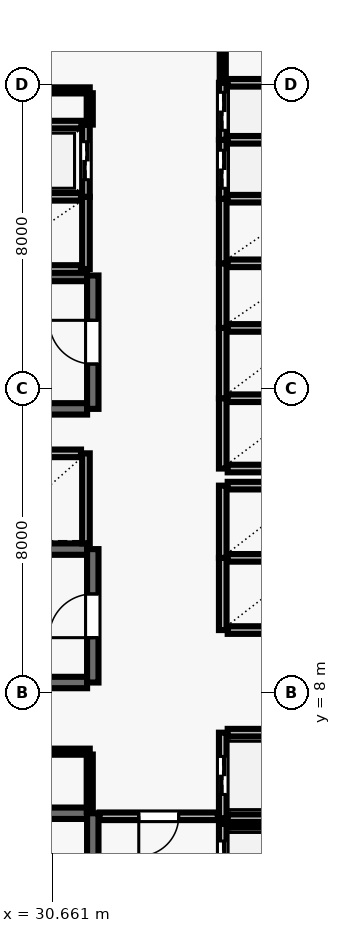
"""IFC4 building model, lengths in metres.
Left out: names, types, materials, properties, quantities, classifications, styles, units other than length and angle.
Written with IfcOpenShell. Run it as: python <this file> out.ifc"""

import sys

from ifc_helpers import new_model, si_unit, direction, frame, frame_2d, origin, place, context, subcontext, project, spatial, rectangle, extrude, element, fill, save


model = new_model("IFC4")
c1 = context("Model", 3, precision=1e-05, world=origin(), true_north=direction((0.0, 1.0)))
c2 = subcontext(c1, "Body", "Model", "MODEL_VIEW")
j1 = project(units=[si_unit("LENGTHUNIT", "METRE"), si_unit("PLANEANGLEUNIT", "RADIAN")], contexts=[c1])
p1 = place(None, origin())
s1 = spatial("IfcSite", under=j1, at=p1, CompositionType="ELEMENT")
p2 = place(p1, origin())
s2 = spatial("IfcBuilding", under=s1, at=p2, CompositionType="ELEMENT")
p3 = place(p2, frame((0.0, 0.0, 5.2)))
s3 = spatial("IfcBuildingStorey", under=s2, at=p3, CompositionType="ELEMENT", Elevation=5.2)
p4 = place(p3, frame((31.58, 4.83, 0.0), z_axis=(0.0, 0.0, 1.0), x_axis=(-1.0, 0.0, 0.0)))
e1 = element("IfcWall", 1, at=p4, inside=s3, PredefinedType="SHEAR", context=c2, shape_type="SweptSolid", body=[
    extrude(rectangle(XDim=8.36, YDim=0.3, at=frame_2d((4.18, 0.0))), origin(), (0.0, 0.0, 1.0), 4.92),
])
p5 = place(p3, frame((31.73, 0.96, 0.0), z_axis=(0.0, 0.0, 1.0), x_axis=(0.0, 1.0, 0.0)))
e2 = element("IfcWall", 2, at=p5, inside=s3, PredefinedType="SHEAR", context=c2, shape_type="SweptSolid", body=[
    extrude(rectangle(XDim=3.87, YDim=0.3, at=frame_2d((1.935, 0.0))), origin(), (0.0, 0.0, 1.0), 4.92),
])
p6 = place(p5, frame((1.54, 0.0, 0.0)))
e3 = element("IfcOpeningElement", 3, at=p6, cuts=e2, PredefinedType="OPENING", context=c2, shape_type="SweptSolid", body=[
    extrude(rectangle(XDim=1.15, YDim=2.15, at=frame_2d((0.575, 1.075))), frame((0.0, 0.16, 0.0), z_axis=(0.0, -1.0, 0.0), x_axis=(1.0, 0.0, 0.0)), (0.0, 0.0, 1.0), 0.32),
])
for number, where, z_axis, x_axis in (
    (4, (31.58, 18.98, 0.0), (0.0, 0.0, 1.0), (-1.0, 0.0, 0.0)),
    (5, (23.22, 15.47, 0.0), (0.0, 0.0, 1.0), (1.0, 0.0, 0.0)),
):
    element("IfcWall", number, at=place(p3, frame(where, z_axis=z_axis, x_axis=x_axis)), inside=s3, PredefinedType="SHEAR", context=c2, shape_type="SweptSolid", body=[
        extrude(rectangle(XDim=8.36, YDim=0.3, at=frame_2d((4.18, 0.0))), origin(), (0.0, 0.0, 1.0), 4.92),
    ])
p7 = place(p3, frame((31.73, 15.47, 0.0), z_axis=(0.0, 0.0, 1.0), x_axis=(0.0, 1.0, 0.0)))
e6 = element("IfcWall", 6, at=p7, inside=s3, PredefinedType="SHEAR", context=c2, shape_type="SweptSolid", body=[
    extrude(rectangle(XDim=3.51, YDim=0.3, at=frame_2d((1.755, 0.0))), origin(), (0.0, 0.0, 1.0), 4.92),
])
p8 = place(p7, frame((1.18, 0.0, 0.0)))
e7 = element("IfcOpeningElement", 7, at=p8, cuts=e6, PredefinedType="OPENING", context=c2, shape_type="SweptSolid", body=[
    extrude(rectangle(XDim=1.15, YDim=2.15, at=frame_2d((0.575, 1.075))), frame((0.0, 0.16, 0.0), z_axis=(0.0, -1.0, 0.0), x_axis=(1.0, 0.0, 0.0)), (0.0, 0.0, 1.0), 0.32),
])
for number, where, z_axis, x_axis in (
    (8, (31.58, 11.78, 0.0), (0.0, 0.0, 1.0), (-1.0, 0.0, 0.0)),
    (9, (23.22, 8.27, 0.0), (0.0, 0.0, 1.0), (1.0, 0.0, 0.0)),
):
    element("IfcWall", number, at=place(p3, frame(where, z_axis=z_axis, x_axis=x_axis)), inside=s3, PredefinedType="SHEAR", context=c2, shape_type="SweptSolid", body=[
        extrude(rectangle(XDim=8.36, YDim=0.3, at=frame_2d((4.18, 0.0))), origin(), (0.0, 0.0, 1.0), 4.92),
    ])
p9 = place(p3, frame((31.73, 8.27, 0.0), z_axis=(0.0, 0.0, 1.0), x_axis=(0.0, 1.0, 0.0)))
e10 = element("IfcWall", 10, at=p9, inside=s3, PredefinedType="SHEAR", context=c2, shape_type="SweptSolid", body=[
    extrude(rectangle(XDim=3.51, YDim=0.3, at=frame_2d((1.755, 0.0))), origin(), (0.0, 0.0, 1.0), 4.92),
])
p10 = place(p9, frame((1.18, 0.0, 0.0)))
e11 = element("IfcOpeningElement", 11, at=p10, cuts=e10, PredefinedType="OPENING", context=c2, shape_type="SweptSolid", body=[
    extrude(rectangle(XDim=1.15, YDim=2.15, at=frame_2d((0.575, 1.075))), frame((0.0, 0.16, 0.0), z_axis=(0.0, -1.0, 0.0), x_axis=(1.0, 0.0, 0.0)), (0.0, 0.0, 1.0), 0.32),
])
p11 = place(p3, frame((35.15, 4.55, 0.0), z_axis=(0.0, 0.0, 1.0), x_axis=(0.0, -1.0, 0.0)))
e12 = element("IfcWall", 12, at=p11, inside=s3, PredefinedType="SOLIDWALL", context=c2, shape_type="SweptSolid", body=[
    extrude(rectangle(XDim=2.1, YDim=0.2, at=frame_2d((1.05, 0.0))), origin(), (0.0, 0.0, 1.0), 4.92),
])
p12 = place(p11, frame((0.45, 0.0, 0.0)))
e13 = element("IfcOpeningElement", 13, at=p12, cuts=e12, PredefinedType="OPENING", context=c2, shape_type="SweptSolid", body=[
    extrude(rectangle(XDim=1.2, YDim=2.15, at=frame_2d((0.6, 1.075))), frame((0.0, 0.11, 0.0), z_axis=(0.0, -1.0, 0.0), x_axis=(1.0, 0.0, 0.0)), (0.0, 0.0, 1.0), 0.22),
])
p13 = place(p3, frame((37.42, 4.55, 0.0), z_axis=(0.0, 0.0, 1.0), x_axis=(-1.0, 0.0, 0.0)))
e14 = element("IfcWall", 14, at=p13, inside=s3, PredefinedType="SOLIDWALL", context=c2, shape_type="SweptSolid", body=[
    extrude(rectangle(XDim=2.14, YDim=0.2, at=frame_2d((1.07, 0.0))), origin(), (0.0, 0.0, 1.0), 4.92),
])
p14 = place(p3, frame((35.15, 6.95, 0.0), z_axis=(0.0, 0.0, 1.0), x_axis=(0.0, -1.0, 0.0)))
e15 = element("IfcWall", 15, at=p14, inside=s3, PredefinedType="SOLIDWALL", context=c2, shape_type="SweptSolid", body=[
    extrude(rectangle(XDim=2.25, YDim=0.2, at=frame_2d((1.125, 0.0))), origin(), (0.0, 0.0, 1.0), 4.92),
])
p15 = place(p14, frame((0.625, 0.0, 0.0)))
e16 = element("IfcOpeningElement", 16, at=p15, cuts=e15, PredefinedType="OPENING", context=c2, shape_type="SweptSolid", body=[
    extrude(rectangle(XDim=1.0, YDim=2.1, at=frame_2d((0.5, 1.05))), frame((0.0, 0.11, 0.0), z_axis=(0.0, -1.0, 0.0), x_axis=(1.0, 0.0, 0.0)), (0.0, 0.0, 1.0), 0.22),
])
for number, where, z_axis, x_axis in (
    (17, (35.28, 4.7, 0.0), (0.0, 0.0, 1.0), (1.0, 0.0, 0.0)),
    (18, (37.42, 6.95, 0.0), (0.0, 0.0, 1.0), (-1.0, 0.0, 0.0)),
):
    element("IfcWall", number, at=place(p3, frame(where, z_axis=z_axis, x_axis=x_axis)), inside=s3, PredefinedType="SOLIDWALL", context=c2, shape_type="SweptSolid", body=[
        extrude(rectangle(XDim=2.14, YDim=0.2, at=frame_2d((1.07, 0.0))), origin(), (0.0, 0.0, 1.0), 4.92),
    ])
p16 = place(p3, frame((35.15, 11.55, 0.0), z_axis=(0.0, 0.0, 1.0), x_axis=(0.0, -1.0, 0.0)))
e19 = element("IfcWall", 19, at=p16, inside=s3, PredefinedType="SOLIDWALL", context=c2, shape_type="SweptSolid", body=[
    extrude(rectangle(XDim=1.9, YDim=0.2, at=frame_2d((0.95, 0.0))), origin(), (0.0, 0.0, 1.0), 4.92),
])
for number, where, z_axis, x_axis in (
    (20, (35.28, 9.65, 0.0), (0.0, 0.0, 1.0), (1.0, 0.0, 0.0)),
    (21, (37.42, 11.55, 0.0), (0.0, 0.0, 1.0), (-1.0, 0.0, 0.0)),
):
    element("IfcWall", number, at=place(p3, frame(where, z_axis=z_axis, x_axis=x_axis)), inside=s3, PredefinedType="SOLIDWALL", context=c2, shape_type="SweptSolid", body=[
        extrude(rectangle(XDim=2.14, YDim=0.2, at=frame_2d((1.07, 0.0))), origin(), (0.0, 0.0, 1.0), 4.92),
    ])
p17 = place(p3, frame((35.15, 13.45, 0.0), z_axis=(0.0, 0.0, 1.0), x_axis=(0.0, -1.0, 0.0)))
e22 = element("IfcWall", 22, at=p17, inside=s3, PredefinedType="SOLIDWALL", context=c2, shape_type="SweptSolid", body=[
    extrude(rectangle(XDim=1.9, YDim=0.2, at=frame_2d((0.95, 0.0))), origin(), (0.0, 0.0, 1.0), 4.92),
])
p18 = place(p3, frame((37.42, 13.45, 0.0), z_axis=(0.0, 0.0, 1.0), x_axis=(-1.0, 0.0, 0.0)))
e23 = element("IfcWall", 23, at=p18, inside=s3, PredefinedType="SOLIDWALL", context=c2, shape_type="SweptSolid", body=[
    extrude(rectangle(XDim=2.14, YDim=0.2, at=frame_2d((1.07, 0.0))), origin(), (0.0, 0.0, 1.0), 4.92),
])
p19 = place(p3, frame((31.55, 11.93, 0.0), z_axis=(0.0, 0.0, 1.0), x_axis=(0.0, 1.0, 0.0)))
e24 = element("IfcWall", 24, at=p19, inside=s3, PredefinedType="SOLIDWALL", context=c2, shape_type="SweptSolid", body=[
    extrude(rectangle(XDim=2.37, YDim=0.2, at=frame_2d((1.185, 0.0))), origin(), (0.0, 0.0, 1.0), 4.92),
])
p20 = place(p3, frame((31.42, 14.3, 0.0), z_axis=(0.0, 0.0, 1.0), x_axis=(-1.0, 0.0, 0.0)))
e25 = element("IfcWall", 25, at=p20, inside=s3, PredefinedType="SOLIDWALL", context=c2, shape_type="SweptSolid", body=[
    extrude(rectangle(XDim=2.44, YDim=0.2, at=frame_2d((1.22, 0.0))), origin(), (0.0, 0.0, 1.0), 4.92),
])
p21 = place(p3, frame((35.15, 15.75, 0.0), z_axis=(0.0, 0.0, 1.0), x_axis=(0.0, -1.0, 0.0)))
e26 = element("IfcWall", 26, at=p21, inside=s3, PredefinedType="SOLIDWALL", context=c2, shape_type="SweptSolid", body=[
    extrude(rectangle(XDim=1.85, YDim=0.2, at=frame_2d((0.925, 0.0))), origin(), (0.0, 0.0, 1.0), 4.92),
])
for number, where, z_axis, x_axis in (
    (27, (35.28, 13.9, 0.0), (0.0, 0.0, 1.0), (1.0, 0.0, 0.0)),
    (28, (37.42, 15.75, 0.0), (0.0, 0.0, 1.0), (-1.0, 0.0, 0.0)),
):
    element("IfcWall", number, at=place(p3, frame(where, z_axis=z_axis, x_axis=x_axis)), inside=s3, PredefinedType="SOLIDWALL", context=c2, shape_type="SweptSolid", body=[
        extrude(rectangle(XDim=2.14, YDim=0.2, at=frame_2d((1.07, 0.0))), origin(), (0.0, 0.0, 1.0), 4.92),
    ])
p22 = place(p3, frame((35.15, 17.6, 0.0), z_axis=(0.0, 0.0, 1.0), x_axis=(0.0, -1.0, 0.0)))
e29 = element("IfcWall", 29, at=p22, inside=s3, PredefinedType="SOLIDWALL", context=c2, shape_type="SweptSolid", body=[
    extrude(rectangle(XDim=1.85, YDim=0.2, at=frame_2d((0.925, 0.0))), origin(), (0.0, 0.0, 1.0), 4.92),
])
p23 = place(p3, frame((37.42, 17.6, 0.0), z_axis=(0.0, 0.0, 1.0), x_axis=(-1.0, 0.0, 0.0)))
e30 = element("IfcWall", 30, at=p23, inside=s3, PredefinedType="SOLIDWALL", context=c2, shape_type="SweptSolid", body=[
    extrude(rectangle(XDim=2.14, YDim=0.2, at=frame_2d((1.07, 0.0))), origin(), (0.0, 0.0, 1.0), 4.92),
])
p24 = place(p3, frame((35.15, 19.3, 0.0), z_axis=(0.0, 0.0, 1.0), x_axis=(0.0, -1.0, 0.0)))
e31 = element("IfcWall", 31, at=p24, inside=s3, PredefinedType="SOLIDWALL", context=c2, shape_type="SweptSolid", body=[
    extrude(rectangle(XDim=1.7, YDim=0.2, at=frame_2d((0.85, 0.0))), origin(), (0.0, 0.0, 1.0), 4.92),
])
p25 = place(p3, frame((37.42, 19.3, 0.0), z_axis=(0.0, 0.0, 1.0), x_axis=(-1.0, 0.0, 0.0)))
e32 = element("IfcWall", 32, at=p25, inside=s3, PredefinedType="SOLIDWALL", context=c2, shape_type="SweptSolid", body=[
    extrude(rectangle(XDim=2.14, YDim=0.2, at=frame_2d((1.07, 0.0))), origin(), (0.0, 0.0, 1.0), 4.92),
])
p26 = place(p3, frame((35.15, 21.0, 0.0), z_axis=(0.0, 0.0, 1.0), x_axis=(0.0, -1.0, 0.0)))
e33 = element("IfcWall", 33, at=p26, inside=s3, PredefinedType="SOLIDWALL", context=c2, shape_type="SweptSolid", body=[
    extrude(rectangle(XDim=1.7, YDim=0.2, at=frame_2d((0.85, 0.0))), origin(), (0.0, 0.0, 1.0), 4.92),
])
p27 = place(p3, frame((37.42, 21.0, 0.0), z_axis=(0.0, 0.0, 1.0), x_axis=(-1.0, 0.0, 0.0)))
e34 = element("IfcWall", 34, at=p27, inside=s3, PredefinedType="SOLIDWALL", context=c2, shape_type="SweptSolid", body=[
    extrude(rectangle(XDim=2.14, YDim=0.2, at=frame_2d((1.07, 0.0))), origin(), (0.0, 0.0, 1.0), 4.92),
])
p28 = place(p3, frame((31.55, 19.15, 0.0), z_axis=(0.0, 0.0, 1.0), x_axis=(0.0, 1.0, 0.0)))
e35 = element("IfcWall", 35, at=p28, inside=s3, PredefinedType="SOLIDWALL", context=c2, shape_type="SweptSolid", body=[
    extrude(rectangle(XDim=1.9, YDim=0.2, at=frame_2d((0.95, 0.0))), origin(), (0.0, 0.0, 1.0), 4.92),
])
for number, where, z_axis, x_axis in (
    (36, (28.98, 19.15, 0.0), (0.0, 0.0, 1.0), (1.0, 0.0, 0.0)),
    (37, (31.42, 21.05, 0.0), (0.0, 0.0, 1.0), (-1.0, 0.0, 0.0)),
):
    element("IfcWall", number, at=place(p3, frame(where, z_axis=z_axis, x_axis=x_axis)), inside=s3, PredefinedType="SOLIDWALL", context=c2, shape_type="SweptSolid", body=[
        extrude(rectangle(XDim=2.44, YDim=0.2, at=frame_2d((1.22, 0.0))), origin(), (0.0, 0.0, 1.0), 4.92),
    ])
p29 = place(p3, frame((35.15, 22.55, 0.0), z_axis=(0.0, 0.0, 1.0), x_axis=(0.0, -1.0, 0.0)))
e38 = element("IfcWall", 38, at=p29, inside=s3, PredefinedType="SOLIDWALL", context=c2, shape_type="SweptSolid", body=[
    extrude(rectangle(XDim=1.55, YDim=0.2, at=frame_2d((0.775, 0.0))), origin(), (0.0, 0.0, 1.0), 4.92),
])
p30 = place(p29, frame((0.275, 0.0, 0.0)))
e39 = element("IfcOpeningElement", 39, at=p30, cuts=e38, PredefinedType="OPENING", context=c2, shape_type="SweptSolid", body=[
    extrude(rectangle(XDim=1.0, YDim=2.1, at=frame_2d((0.5, 1.05))), frame((0.0, 0.11, 0.0), z_axis=(0.0, -1.0, 0.0), x_axis=(1.0, 0.0, 0.0)), (0.0, 0.0, 1.0), 0.22),
])
p31 = place(p3, frame((37.42, 22.55, 0.0), z_axis=(0.0, 0.0, 1.0), x_axis=(-1.0, 0.0, 0.0)))
e40 = element("IfcWall", 40, at=p31, inside=s3, PredefinedType="SOLIDWALL", context=c2, shape_type="SweptSolid", body=[
    extrude(rectangle(XDim=2.14, YDim=0.2, at=frame_2d((1.07, 0.0))), origin(), (0.0, 0.0, 1.0), 4.92),
])
p32 = place(p3, frame((35.15, 24.05, 0.0), z_axis=(0.0, 0.0, 1.0), x_axis=(0.0, -1.0, 0.0)))
e41 = element("IfcWall", 41, at=p32, inside=s3, PredefinedType="SOLIDWALL", context=c2, shape_type="SweptSolid", body=[
    extrude(rectangle(XDim=1.5, YDim=0.2, at=frame_2d((0.75, 0.0))), origin(), (0.0, 0.0, 1.0), 4.92),
])
p33 = place(p32, frame((0.25, 0.0, 0.0)))
e42 = element("IfcOpeningElement", 42, at=p33, cuts=e41, PredefinedType="OPENING", context=c2, shape_type="SweptSolid", body=[
    extrude(rectangle(XDim=1.0, YDim=2.1, at=frame_2d((0.5, 1.05))), frame((0.0, 0.11, 0.0), z_axis=(0.0, -1.0, 0.0), x_axis=(1.0, 0.0, 0.0)), (0.0, 0.0, 1.0), 0.22),
])
p34 = place(p3, frame((37.42, 24.05, 0.0), z_axis=(0.0, 0.0, 1.0), x_axis=(-1.0, 0.0, 0.0)))
e43 = element("IfcWall", 43, at=p34, inside=s3, PredefinedType="SOLIDWALL", context=c2, shape_type="SweptSolid", body=[
    extrude(rectangle(XDim=2.14, YDim=0.2, at=frame_2d((1.07, 0.0))), origin(), (0.0, 0.0, 1.0), 4.92),
])
p35 = place(p3, frame((31.55, 21.05, 0.0), z_axis=(0.0, 0.0, 1.0), x_axis=(0.0, 1.0, 0.0)))
e44 = element("IfcWall", 44, at=p35, inside=s3, PredefinedType="SOLIDWALL", context=c2, shape_type="SweptSolid", body=[
    extrude(rectangle(XDim=1.9, YDim=0.2, at=frame_2d((0.95, 0.0))), origin(), (0.0, 0.0, 1.0), 4.92),
])
p36 = place(p35, frame((0.45, 0.0, 0.0)))
e45 = element("IfcOpeningElement", 45, at=p36, cuts=e44, PredefinedType="OPENING", context=c2, shape_type="SweptSolid", body=[
    extrude(rectangle(XDim=1.0, YDim=2.1, at=frame_2d((0.5, 1.05))), frame((0.0, 0.11, 0.0), z_axis=(0.0, -1.0, 0.0), x_axis=(1.0, 0.0, 0.0)), (0.0, 0.0, 1.0), 0.22),
])
p37 = place(p3, frame((31.43, 22.95, 0.0), z_axis=(0.0, 0.0, 1.0), x_axis=(-1.0, 0.0, 0.0)))
e46 = element("IfcWall", 46, at=p37, inside=s3, PredefinedType="SOLIDWALL", context=c2, shape_type="SweptSolid", body=[
    extrude(rectangle(XDim=2.46, YDim=0.2, at=frame_2d((1.23, 0.0))), origin(), (0.0, 0.0, 1.0), 4.92),
])
p38 = place(p3, frame((28.55, 6.45, 0.0), z_axis=(0.0, 0.0, 1.0), x_axis=(1.0, 0.0, 0.0)))
e47 = element("IfcWall", 47, at=p38, inside=s3, PredefinedType="PARTITIONING", context=c2, shape_type="SweptSolid", body=[
    extrude(rectangle(XDim=3.1, YDim=0.16, at=frame_2d((1.55, 0.0))), origin(), (0.0, 0.0, 1.0), 4.92),
])
p39 = place(p38, frame((1.11, 0.0, 0.0)))
e48 = element("IfcOpeningElement", 48, at=p39, cuts=e47, PredefinedType="OPENING", context=c2, shape_type="SweptSolid", body=[
    extrude(rectangle(XDim=0.88, YDim=2.1, at=frame_2d((0.44, 1.05))), frame((0.0, 0.09, 0.0), z_axis=(0.0, -1.0, 0.0), x_axis=(1.0, 0.0, 0.0)), (0.0, 0.0, 1.0), 0.18),
])
p40 = place(p3, frame((28.8, 23.85, 0.0), z_axis=(0.0, 0.0, 1.0), x_axis=(1.0, 0.0, 0.0)))
e49 = element("IfcWall", 49, at=p40, inside=s3, PredefinedType="PARTITIONING", context=c2, shape_type="SweptSolid", body=[
    extrude(rectangle(XDim=2.85, YDim=0.16, at=frame_2d((1.425, 0.0))), origin(), (0.0, 0.0, 1.0), 4.92),
])
p41 = place(p3, frame((35.02, 4.75, 0.0), z_axis=(0.0, 0.0, 1.0), x_axis=(-1.0, 0.0, 0.0)))
e50 = element("IfcWall", 50, at=p41, inside=s3, PredefinedType="SOLIDWALL", context=c2, shape_type="SweptSolid", body=[
    extrude(rectangle(XDim=3.11, YDim=0.2, at=frame_2d((1.555, 0.0))), origin(), (0.0, 0.0, 1.0), 4.92),
])
p42 = place(p41, frame((1.03, 0.0, 0.0)))
e51 = element("IfcOpeningElement", 51, at=p42, cuts=e50, PredefinedType="OPENING", context=c2, shape_type="SweptSolid", body=[
    extrude(rectangle(XDim=1.05, YDim=2.15, at=frame_2d((0.525, 1.075))), frame((0.0, 0.11, 0.0), z_axis=(0.0, -1.0, 0.0), x_axis=(1.0, 0.0, 0.0)), (0.0, 0.0, 1.0), 0.22),
])
p43 = place(p3, frame((31.65, 4.86, 0.0), z_axis=(0.0, 0.0, 1.0), x_axis=(0.0, 1.0, 0.0)))
e52 = element("IfcWall", 52, at=p43, inside=s3, PredefinedType="PARTITIONING", context=c2, shape_type="SweptSolid", body=[
    extrude(rectangle(XDim=1.515, YDim=0.16, at=frame_2d((0.757, 0.0))), origin(), (0.0, 0.0, 1.0), 4.92),
])
p44 = place(p3, frame((31.65, 23.775, 0.0), z_axis=(0.0, 0.0, 1.0), x_axis=(0.0, -1.0, 0.0)))
e53 = element("IfcWall", 53, at=p44, inside=s3, PredefinedType="PARTITIONING", context=c2, shape_type="SweptSolid", body=[
    extrude(rectangle(XDim=0.825, YDim=0.16, at=frame_2d((0.413, 0.0))), origin(), (0.0, 0.0, 1.0), 4.92),
])
p45 = place(p3, frame((35.15, 24.07, 0.0), z_axis=(0.0, 0.0, 1.0), x_axis=(0.0, 1.0, 0.0)))
e54 = element("IfcWall", 54, at=p45, inside=s3, PredefinedType="PARTITIONING", context=c2, shape_type="SweptSolid", body=[
    extrude(rectangle(XDim=1.855, YDim=0.16, at=frame_2d((0.927, 0.0))), origin(), (0.0, 0.0, 1.0), 4.92),
])
p46 = place(p8, origin())
e55 = element("IfcDoor", 55, at=p46, inside=s3, OperationType="SINGLE_SWING_RIGHT", PredefinedType="DOOR", context=c2, shape_type="SweptSolid", body=[
    extrude(rectangle(XDim=1.15, YDim=2.15, at=frame_2d((0.575, 1.075))), frame((0.0, 0.025, 0.0), z_axis=(0.0, -1.0, 0.0), x_axis=(1.0, 0.0, 0.0)), (0.0, 0.0, 1.0), 0.05),
])
fill(e7, e55)
p47 = place(p10, origin())
e56 = element("IfcDoor", 56, at=p47, inside=s3, OperationType="SINGLE_SWING_LEFT", PredefinedType="DOOR", context=c2, shape_type="SweptSolid", body=[
    extrude(rectangle(XDim=1.15, YDim=2.15, at=frame_2d((0.575, 1.075))), frame((0.0, 0.025, 0.0), z_axis=(0.0, -1.0, 0.0), x_axis=(1.0, 0.0, 0.0)), (0.0, 0.0, 1.0), 0.05),
])
fill(e11, e56)
p48 = place(p12, origin())
e57 = element("IfcDoor", 57, at=p48, inside=s3, OperationType="DOUBLE_DOOR_SLIDING", PredefinedType="DOOR", context=c2, shape_type="SweptSolid", body=[
    extrude(rectangle(XDim=1.2, YDim=2.15, at=frame_2d((0.6, 1.075))), frame((0.0, 0.025, 0.0), z_axis=(0.0, -1.0, 0.0), x_axis=(1.0, 0.0, 0.0)), (0.0, 0.0, 1.0), 0.05),
])
fill(e13, e57)
p49 = place(p15, origin())
e58 = element("IfcDoor", 58, at=p49, inside=s3, OperationType="DOUBLE_DOOR_SLIDING", PredefinedType="DOOR", context=c2, shape_type="SweptSolid", body=[
    extrude(rectangle(XDim=1.0, YDim=2.1, at=frame_2d((0.5, 1.05))), frame((0.0, 0.025, 0.0), z_axis=(0.0, -1.0, 0.0), x_axis=(1.0, 0.0, 0.0)), (0.0, 0.0, 1.0), 0.05),
])
fill(e16, e58)
p50 = place(p30, origin())
e59 = element("IfcDoor", 59, at=p50, inside=s3, OperationType="DOUBLE_DOOR_SLIDING", PredefinedType="DOOR", context=c2, shape_type="SweptSolid", body=[
    extrude(rectangle(XDim=1.0, YDim=2.1, at=frame_2d((0.5, 1.05))), frame((0.0, 0.025, 0.0), z_axis=(0.0, -1.0, 0.0), x_axis=(1.0, 0.0, 0.0)), (0.0, 0.0, 1.0), 0.05),
])
fill(e39, e59)
p51 = place(p33, origin())
e60 = element("IfcDoor", 60, at=p51, inside=s3, OperationType="DOUBLE_DOOR_SLIDING", PredefinedType="DOOR", context=c2, shape_type="SweptSolid", body=[
    extrude(rectangle(XDim=1.0, YDim=2.1, at=frame_2d((0.5, 1.05))), frame((0.0, 0.025, 0.0), z_axis=(0.0, -1.0, 0.0), x_axis=(1.0, 0.0, 0.0)), (0.0, 0.0, 1.0), 0.05),
])
fill(e42, e60)
p52 = place(p36, origin())
e61 = element("IfcDoor", 61, at=p52, inside=s3, OperationType="DOUBLE_DOOR_SLIDING", PredefinedType="DOOR", context=c2, shape_type="SweptSolid", body=[
    extrude(rectangle(XDim=1.0, YDim=2.1, at=frame_2d((0.5, 1.05))), frame((0.0, 0.025, 0.0), z_axis=(0.0, -1.0, 0.0), x_axis=(1.0, 0.0, 0.0)), (0.0, 0.0, 1.0), 0.05),
])
fill(e45, e61)
p53 = place(p42, origin())
e62 = element("IfcDoor", 62, at=p53, inside=s3, OperationType="SINGLE_SWING_RIGHT", PredefinedType="DOOR", context=c2, shape_type="SweptSolid", body=[
    extrude(rectangle(XDim=1.05, YDim=2.15, at=frame_2d((0.525, 1.075))), frame((0.0, 0.025, 0.0), z_axis=(0.0, -1.0, 0.0), x_axis=(1.0, 0.0, 0.0)), (0.0, 0.0, 1.0), 0.05),
])
fill(e51, e62)
save(model, sys.argv[1])
